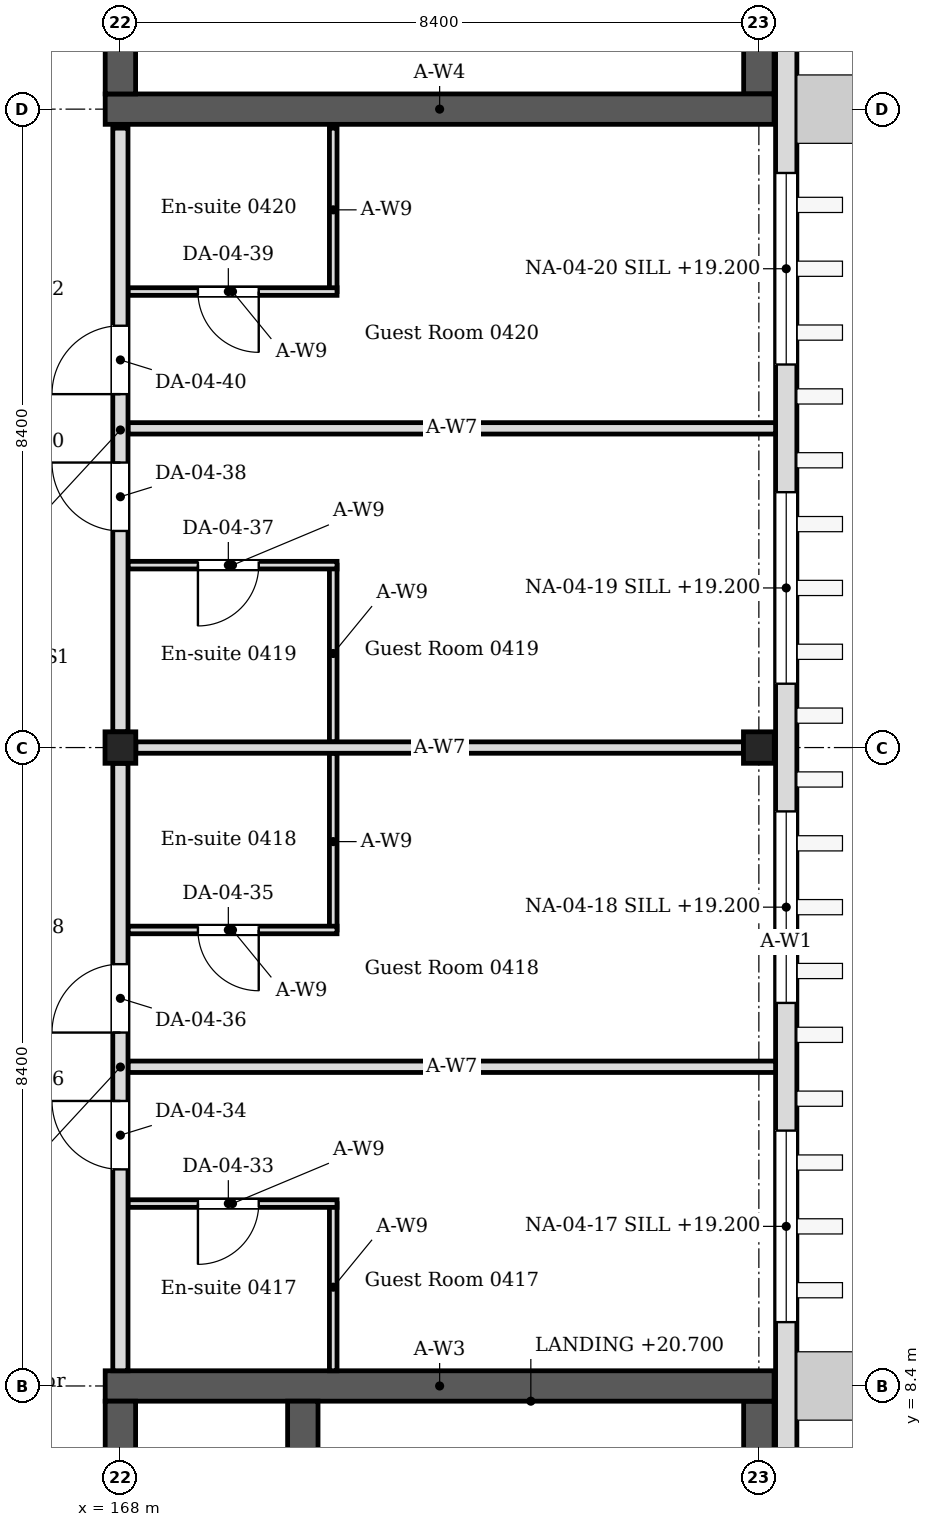
"""IFC4 building model, lengths in metres.
Left out: names, types, materials, properties, quantities, classifications, styles, units other than length and angle.
Written with IfcOpenShell. Run it as: python <this file> out.ifc"""

import sys

from ifc_helpers import new_model, si_unit, direction, frame, frame_2d, origin, origin_2d, place, context, subcontext, project, spatial, rectangle, i_section, extrude, element, fill, save


model = new_model("IFC4")
c1 = context("Model", 3, precision=1e-05, world=origin(), true_north=direction((0.0, 1.0)))
c2 = subcontext(c1, "Body", "Model", "MODEL_VIEW")
j1 = project(units=[si_unit("LENGTHUNIT", "METRE"), si_unit("PLANEANGLEUNIT", "RADIAN")], contexts=[c1])
p1 = place(None, origin())
s1 = spatial("IfcSite", under=j1, at=p1, CompositionType="ELEMENT")
p2 = place(p1, origin())
s2 = spatial("IfcBuilding", under=s1, at=p2, CompositionType="ELEMENT")
p3 = place(p2, frame((0.0, 0.0, 18.6)))
s3 = spatial("IfcBuildingStorey", under=s2, at=p3, CompositionType="ELEMENT", Elevation=18.6)
for number, where, z_axis, x_axis in (
    (1, (168.0, 16.8, 0.0), (0.0, 0.0, 1.0), (1.0, 0.0, 0.0)),
    (2, (176.4, 16.8, 0.0), (0.0, 0.0, 1.0), (1.0, 0.0, 0.0)),
):
    element("IfcColumn", number, at=place(p3, frame(where, z_axis=z_axis, x_axis=x_axis)), inside=s3, PredefinedType="COLUMN", context=c2, shape_type="SweptSolid", body=[
        extrude(i_section(OverallWidth=0.405, OverallDepth=0.414, WebThickness=0.018, FlangeThickness=0.028, FilletRadius=0.022, at=origin_2d()), origin(), (0.0, 0.0, 1.0), 4.2),
    ])
p4 = place(p3, frame((167.8, 8.4, 0.0), z_axis=(0.0, 0.0, 1.0), x_axis=(1.0, 0.0, 0.0)))
e3 = element("IfcWall", 3, at=p4, inside=s3, PredefinedType="SOLIDWALL", context=c2, shape_type="SweptSolid", body=[
    extrude(rectangle(XDim=8.8, YDim=0.4, at=frame_2d((4.4, 0.0))), origin(), (0.0, 0.0, 1.0), 4.05),
])
p5 = place(p3, frame((168.0, 0.2, 0.0), z_axis=(0.0, 0.0, 1.0), x_axis=(0.0, 1.0, 0.0)))
e4 = element("IfcWall", 4, at=p5, inside=s3, PredefinedType="SOLIDWALL", context=c2, shape_type="SweptSolid", body=[
    extrude(rectangle(XDim=8.0, YDim=0.4, at=frame_2d((4.0, 0.0))), origin(), (0.0, 0.0, 1.0), 4.05),
])
p6 = place(p5, frame((1.75, 0.0, 0.0)))
e5 = element("IfcOpeningElement", 5, at=p6, cuts=e4, PredefinedType="OPENING", context=c2, shape_type="SweptSolid", body=[
    extrude(rectangle(XDim=1.0, YDim=2.1, at=frame_2d((0.5, 1.05))), frame((0.0, 0.21, 0.0), z_axis=(0.0, -1.0, 0.0), x_axis=(1.0, 0.0, 0.0)), (0.0, 0.0, 1.0), 0.42),
])
p7 = place(p5, frame((5.675, 0.0, 0.0)))
e6 = element("IfcOpeningElement", 6, at=p7, cuts=e4, PredefinedType="OPENING", context=c2, shape_type="SweptSolid", body=[
    extrude(rectangle(XDim=1.05, YDim=2.1, at=frame_2d((0.525, 1.05))), frame((0.0, 0.21, 0.0), z_axis=(0.0, -1.0, 0.0), x_axis=(1.0, 0.0, 0.0)), (0.0, 0.0, 1.0), 0.42),
])
p8 = place(p3, frame((176.4, 0.2, 0.0), z_axis=(0.0, 0.0, 1.0), x_axis=(0.0, 1.0, 0.0)))
e7 = element("IfcWall", 7, at=p8, inside=s3, PredefinedType="SOLIDWALL", context=c2, shape_type="SweptSolid", body=[
    extrude(rectangle(XDim=8.0, YDim=0.4, at=frame_2d((4.0, 0.0))), origin(), (0.0, 0.0, 1.0), 4.05),
])
p9 = place(p3, frame((167.8, 25.2, 0.0), z_axis=(0.0, 0.0, 1.0), x_axis=(1.0, 0.0, 0.0)))
e8 = element("IfcWall", 8, at=p9, inside=s3, PredefinedType="SOLIDWALL", context=c2, shape_type="SweptSolid", body=[
    extrude(rectangle(XDim=8.8, YDim=0.4, at=frame_2d((4.4, 0.0))), origin(), (0.0, 0.0, 1.0), 4.05),
])
p10 = place(p3, frame((168.0, 25.4, 0.0), z_axis=(0.0, 0.0, 1.0), x_axis=(0.0, 1.0, 0.0)))
e9 = element("IfcWall", 9, at=p10, inside=s3, PredefinedType="SOLIDWALL", context=c2, shape_type="SweptSolid", body=[
    extrude(rectangle(XDim=16.4, YDim=0.4, at=frame_2d((8.2, 0.0))), origin(), (0.0, 0.0, 1.0), 4.05),
])
p11 = place(p10, frame((1.0, 0.0, 0.0)))
e10 = element("IfcOpeningElement", 10, at=p11, cuts=e9, PredefinedType="OPENING", context=c2, shape_type="SweptSolid", body=[
    extrude(rectangle(XDim=1.0, YDim=2.1, at=frame_2d((0.5, 1.05))), frame((0.0, 0.21, 0.0), z_axis=(0.0, -1.0, 0.0), x_axis=(1.0, 0.0, 0.0)), (0.0, 0.0, 1.0), 0.42),
])
p12 = place(p10, frame((14.4, 0.0, 0.0)))
e11 = element("IfcOpeningElement", 11, at=p12, cuts=e9, PredefinedType="OPENING", context=c2, shape_type="SweptSolid", body=[
    extrude(rectangle(XDim=1.4, YDim=2.1, at=frame_2d((0.7, 1.05))), frame((0.0, 0.21, 0.0), z_axis=(0.0, -1.0, 0.0), x_axis=(1.0, 0.0, 0.0)), (0.0, 0.0, 1.0), 0.42),
])
p13 = place(p3, frame((176.4, 25.4, 0.0), z_axis=(0.0, 0.0, 1.0), x_axis=(0.0, 1.0, 0.0)))
e12 = element("IfcWall", 12, at=p13, inside=s3, PredefinedType="SOLIDWALL", context=c2, shape_type="SweptSolid", body=[
    extrude(rectangle(XDim=16.4, YDim=0.4, at=frame_2d((8.2, 0.0))), origin(), (0.0, 0.0, 1.0), 4.05),
])
p14 = place(p3, frame((176.76, -0.22, 0.0), z_axis=(0.0, 0.0, 1.0), x_axis=(0.0, 1.0, 0.0)))
e13 = element("IfcWall", 13, at=p14, inside=s3, PredefinedType="SOLIDWALL", context=c2, shape_type="SweptSolid", body=[
    extrude(rectangle(XDim=42.57, YDim=0.28, at=frame_2d((21.285, 0.0))), origin(), (0.0, 0.0, 1.0), 4.05),
])
p15 = place(p14, frame((9.46, 0.0, 0.6)))
e14 = element("IfcOpeningElement", 14, at=p15, cuts=e13, PredefinedType="OPENING", context=c2, shape_type="SweptSolid", body=[
    extrude(rectangle(XDim=2.52, YDim=2.4, at=frame_2d((1.26, 1.2))), frame((0.0, 0.15, 0.0), z_axis=(0.0, -1.0, 0.0), x_axis=(1.0, 0.0, 0.0)), (0.0, 0.0, 1.0), 0.3),
])
p16 = place(p14, frame((13.66, 0.0, 0.6)))
e15 = element("IfcOpeningElement", 15, at=p16, cuts=e13, PredefinedType="OPENING", context=c2, shape_type="SweptSolid", body=[
    extrude(rectangle(XDim=2.52, YDim=2.4, at=frame_2d((1.26, 1.2))), frame((0.0, 0.15, 0.0), z_axis=(0.0, -1.0, 0.0), x_axis=(1.0, 0.0, 0.0)), (0.0, 0.0, 1.0), 0.3),
])
p17 = place(p14, frame((17.86, 0.0, 0.6)))
e16 = element("IfcOpeningElement", 16, at=p17, cuts=e13, PredefinedType="OPENING", context=c2, shape_type="SweptSolid", body=[
    extrude(rectangle(XDim=2.52, YDim=2.4, at=frame_2d((1.26, 1.2))), frame((0.0, 0.15, 0.0), z_axis=(0.0, -1.0, 0.0), x_axis=(1.0, 0.0, 0.0)), (0.0, 0.0, 1.0), 0.3),
])
p18 = place(p14, frame((22.06, 0.0, 0.6)))
e17 = element("IfcOpeningElement", 17, at=p18, cuts=e13, PredefinedType="OPENING", context=c2, shape_type="SweptSolid", body=[
    extrude(rectangle(XDim=2.52, YDim=2.4, at=frame_2d((1.26, 1.2))), frame((0.0, 0.15, 0.0), z_axis=(0.0, -1.0, 0.0), x_axis=(1.0, 0.0, 0.0)), (0.0, 0.0, 1.0), 0.3),
])
p19 = place(p3, frame((170.8, 8.6, 0.0), z_axis=(0.0, 0.0, 1.0), x_axis=(0.0, 1.0, 0.0)))
e18 = element("IfcWall", 18, at=p19, inside=s3, PredefinedType="PARTITIONING", context=c2, shape_type="SweptSolid", body=[
    extrude(rectangle(XDim=2.2, YDim=0.1, at=frame_2d((1.1, 0.0))), origin(), (0.0, 0.0, 1.0), 4.05),
])
p20 = place(p3, frame((170.85, 10.8, 0.0), z_axis=(0.0, 0.0, 1.0), x_axis=(-1.0, 0.0, 0.0)))
e19 = element("IfcWall", 19, at=p20, inside=s3, PredefinedType="PARTITIONING", context=c2, shape_type="SweptSolid", body=[
    extrude(rectangle(XDim=2.75, YDim=0.1, at=frame_2d((1.375, 0.0))), origin(), (0.0, 0.0, 1.0), 4.05),
])
p21 = place(p20, frame((1.03, 0.0, 0.0)))
e20 = element("IfcOpeningElement", 20, at=p21, cuts=e19, PredefinedType="OPENING", context=c2, shape_type="SweptSolid", body=[
    extrude(rectangle(XDim=0.8, YDim=2.1, at=frame_2d((0.4, 1.05))), frame((0.0, 0.06, 0.0), z_axis=(0.0, -1.0, 0.0), x_axis=(1.0, 0.0, 0.0)), (0.0, 0.0, 1.0), 0.12),
])
p22 = place(p3, frame((170.8, 14.4, 0.0), z_axis=(0.0, 0.0, 1.0), x_axis=(0.0, 1.0, 0.0)))
e21 = element("IfcWall", 21, at=p22, inside=s3, PredefinedType="PARTITIONING", context=c2, shape_type="SweptSolid", body=[
    extrude(rectangle(XDim=2.325, YDim=0.1, at=frame_2d((1.163, 0.0))), origin(), (0.0, 0.0, 1.0), 4.05),
])
p23 = place(p3, frame((170.85, 14.4, 0.0), z_axis=(0.0, 0.0, 1.0), x_axis=(-1.0, 0.0, 0.0)))
e22 = element("IfcWall", 22, at=p23, inside=s3, PredefinedType="PARTITIONING", context=c2, shape_type="SweptSolid", body=[
    extrude(rectangle(XDim=2.75, YDim=0.1, at=frame_2d((1.375, 0.0))), origin(), (0.0, 0.0, 1.0), 4.05),
])
p24 = place(p23, frame((1.03, 0.0, 0.0)))
e23 = element("IfcOpeningElement", 23, at=p24, cuts=e22, PredefinedType="OPENING", context=c2, shape_type="SweptSolid", body=[
    extrude(rectangle(XDim=0.8, YDim=2.1, at=frame_2d((0.4, 1.05))), frame((0.0, 0.06, 0.0), z_axis=(0.0, -1.0, 0.0), x_axis=(1.0, 0.0, 0.0)), (0.0, 0.0, 1.0), 0.12),
])
p25 = place(p3, frame((170.8, 16.875, 0.0), z_axis=(0.0, 0.0, 1.0), x_axis=(0.0, 1.0, 0.0)))
e24 = element("IfcWall", 24, at=p25, inside=s3, PredefinedType="PARTITIONING", context=c2, shape_type="SweptSolid", body=[
    extrude(rectangle(XDim=2.325, YDim=0.1, at=frame_2d((1.163, 0.0))), origin(), (0.0, 0.0, 1.0), 4.05),
])
p26 = place(p3, frame((170.85, 19.2, 0.0), z_axis=(0.0, 0.0, 1.0), x_axis=(-1.0, 0.0, 0.0)))
e25 = element("IfcWall", 25, at=p26, inside=s3, PredefinedType="PARTITIONING", context=c2, shape_type="SweptSolid", body=[
    extrude(rectangle(XDim=2.75, YDim=0.1, at=frame_2d((1.375, 0.0))), origin(), (0.0, 0.0, 1.0), 4.05),
])
p27 = place(p26, frame((1.03, 0.0, 0.0)))
e26 = element("IfcOpeningElement", 26, at=p27, cuts=e25, PredefinedType="OPENING", context=c2, shape_type="SweptSolid", body=[
    extrude(rectangle(XDim=0.8, YDim=2.1, at=frame_2d((0.4, 1.05))), frame((0.0, 0.06, 0.0), z_axis=(0.0, -1.0, 0.0), x_axis=(1.0, 0.0, 0.0)), (0.0, 0.0, 1.0), 0.12),
])
p28 = place(p3, frame((170.8, 22.8, 0.0), z_axis=(0.0, 0.0, 1.0), x_axis=(0.0, 1.0, 0.0)))
e27 = element("IfcWall", 27, at=p28, inside=s3, PredefinedType="PARTITIONING", context=c2, shape_type="SweptSolid", body=[
    extrude(rectangle(XDim=2.15, YDim=0.1, at=frame_2d((1.075, 0.0))), origin(), (0.0, 0.0, 1.0), 4.05),
])
p29 = place(p3, frame((170.85, 22.8, 0.0), z_axis=(0.0, 0.0, 1.0), x_axis=(-1.0, 0.0, 0.0)))
e28 = element("IfcWall", 28, at=p29, inside=s3, PredefinedType="PARTITIONING", context=c2, shape_type="SweptSolid", body=[
    extrude(rectangle(XDim=2.75, YDim=0.1, at=frame_2d((1.375, 0.0))), origin(), (0.0, 0.0, 1.0), 4.05),
])
p30 = place(p29, frame((1.03, 0.0, 0.0)))
e29 = element("IfcOpeningElement", 29, at=p30, cuts=e28, PredefinedType="OPENING", context=c2, shape_type="SweptSolid", body=[
    extrude(rectangle(XDim=0.8, YDim=2.1, at=frame_2d((0.4, 1.05))), frame((0.0, 0.06, 0.0), z_axis=(0.0, -1.0, 0.0), x_axis=(1.0, 0.0, 0.0)), (0.0, 0.0, 1.0), 0.12),
])
p31 = place(p3, frame((168.202, 16.8, 0.0), z_axis=(0.0, 0.0, 1.0), x_axis=(1.0, 0.0, 0.0)))
e30 = element("IfcWall", 30, at=p31, inside=s3, PredefinedType="PARTITIONING", context=c2, shape_type="SweptSolid", body=[
    extrude(rectangle(XDim=7.995, YDim=0.15, at=frame_2d((3.998, 0.0))), origin(), (0.0, 0.0, 1.0), 3.604),
])
for number, where, z_axis, x_axis in (
    (31, (168.1, 12.6, 0.0), (0.0, 0.0, 1.0), (1.0, 0.0, 0.0)),
    (32, (168.1, 21.0, 0.0), (0.0, 0.0, 1.0), (1.0, 0.0, 0.0)),
):
    element("IfcWall", number, at=place(p3, frame(where, z_axis=z_axis, x_axis=x_axis)), inside=s3, PredefinedType="PARTITIONING", context=c2, shape_type="SweptSolid", body=[
        extrude(rectangle(XDim=8.52, YDim=0.15, at=frame_2d((4.26, 0.0))), origin(), (0.0, 0.0, 1.0), 3.604),
    ])
p32 = place(p3, frame((168.0, 8.6, 0.0), z_axis=(0.0, 0.0, 1.0), x_axis=(0.0, 1.0, 0.0)))
e33 = element("IfcWall", 33, at=p32, inside=s3, PredefinedType="PARTITIONING", context=c2, shape_type="SweptSolid", body=[
    extrude(rectangle(XDim=7.993, YDim=0.2, at=frame_2d((3.997, 0.0))), origin(), (0.0, 0.0, 1.0), 3.45),
])
p33 = place(p32, frame((2.65, 0.0, 0.0)))
e34 = element("IfcOpeningElement", 34, at=p33, cuts=e33, PredefinedType="OPENING", context=c2, shape_type="SweptSolid", body=[
    extrude(rectangle(XDim=0.9, YDim=2.1, at=frame_2d((0.45, 1.05))), frame((0.0, 0.11, 0.0), z_axis=(0.0, -1.0, 0.0), x_axis=(1.0, 0.0, 0.0)), (0.0, 0.0, 1.0), 0.22),
])
p34 = place(p32, frame((4.45, 0.0, 0.0)))
e35 = element("IfcOpeningElement", 35, at=p34, cuts=e33, PredefinedType="OPENING", context=c2, shape_type="SweptSolid", body=[
    extrude(rectangle(XDim=0.9, YDim=2.1, at=frame_2d((0.45, 1.05))), frame((0.0, 0.11, 0.0), z_axis=(0.0, -1.0, 0.0), x_axis=(1.0, 0.0, 0.0)), (0.0, 0.0, 1.0), 0.22),
])
p35 = place(p3, frame((168.0, 17.007, 0.0), z_axis=(0.0, 0.0, 1.0), x_axis=(0.0, 1.0, 0.0)))
e36 = element("IfcWall", 36, at=p35, inside=s3, PredefinedType="PARTITIONING", context=c2, shape_type="SweptSolid", body=[
    extrude(rectangle(XDim=7.943, YDim=0.2, at=frame_2d((3.971, 0.0))), origin(), (0.0, 0.0, 1.0), 3.45),
])
p36 = place(p35, frame((2.643, 0.0, 0.0)))
e37 = element("IfcOpeningElement", 37, at=p36, cuts=e36, PredefinedType="OPENING", context=c2, shape_type="SweptSolid", body=[
    extrude(rectangle(XDim=0.9, YDim=2.1, at=frame_2d((0.45, 1.05))), frame((0.0, 0.11, 0.0), z_axis=(0.0, -1.0, 0.0), x_axis=(1.0, 0.0, 0.0)), (0.0, 0.0, 1.0), 0.22),
])
p37 = place(p35, frame((4.443, 0.0, 0.0)))
e38 = element("IfcOpeningElement", 38, at=p37, cuts=e36, PredefinedType="OPENING", context=c2, shape_type="SweptSolid", body=[
    extrude(rectangle(XDim=0.9, YDim=2.1, at=frame_2d((0.45, 1.05))), frame((0.0, 0.11, 0.0), z_axis=(0.0, -1.0, 0.0), x_axis=(1.0, 0.0, 0.0)), (0.0, 0.0, 1.0), 0.22),
])
p38 = place(p3, frame((170.4, 0.2, 0.0), z_axis=(0.0, 0.0, 1.0), x_axis=(0.0, 1.0, 0.0)))
e39 = element("IfcWall", 39, at=p38, inside=s3, PredefinedType="SOLIDWALL", context=c2, shape_type="SweptSolid", body=[
    extrude(rectangle(XDim=8.0, YDim=0.4, at=frame_2d((4.0, 0.0))), origin(), (0.0, 0.0, 1.0), 4.05),
])
p39 = place(p38, frame((0.3, 0.0, 0.0)))
e40 = element("IfcOpeningElement", 40, at=p39, cuts=e39, PredefinedType="OPENING", context=c2, shape_type="SweptSolid", body=[
    extrude(rectangle(XDim=0.9, YDim=2.1, at=frame_2d((0.45, 1.05))), frame((0.0, 0.21, 0.0), z_axis=(0.0, -1.0, 0.0), x_axis=(1.0, 0.0, 0.0)), (0.0, 0.0, 1.0), 0.42),
])
p40 = place(p15, origin())
e41 = element("IfcWindow", 41, at=p40, inside=s3, PartitioningType="SINGLE_PANEL", PredefinedType="WINDOW", context=c2, shape_type="SweptSolid", body=[
    extrude(rectangle(XDim=2.52, YDim=2.4, at=frame_2d((1.26, 1.2))), frame((0.0, 0.03, 0.0), z_axis=(0.0, -1.0, 0.0), x_axis=(1.0, 0.0, 0.0)), (0.0, 0.0, 1.0), 0.06),
])
fill(e14, e41)
p41 = place(p16, origin())
e42 = element("IfcWindow", 42, at=p41, inside=s3, PartitioningType="SINGLE_PANEL", PredefinedType="WINDOW", context=c2, shape_type="SweptSolid", body=[
    extrude(rectangle(XDim=2.52, YDim=2.4, at=frame_2d((1.26, 1.2))), frame((0.0, 0.03, 0.0), z_axis=(0.0, -1.0, 0.0), x_axis=(1.0, 0.0, 0.0)), (0.0, 0.0, 1.0), 0.06),
])
fill(e15, e42)
p42 = place(p17, origin())
e43 = element("IfcWindow", 43, at=p42, inside=s3, PartitioningType="SINGLE_PANEL", PredefinedType="WINDOW", context=c2, shape_type="SweptSolid", body=[
    extrude(rectangle(XDim=2.52, YDim=2.4, at=frame_2d((1.26, 1.2))), frame((0.0, 0.03, 0.0), z_axis=(0.0, -1.0, 0.0), x_axis=(1.0, 0.0, 0.0)), (0.0, 0.0, 1.0), 0.06),
])
fill(e16, e43)
p43 = place(p18, origin())
e44 = element("IfcWindow", 44, at=p43, inside=s3, PartitioningType="SINGLE_PANEL", PredefinedType="WINDOW", context=c2, shape_type="SweptSolid", body=[
    extrude(rectangle(XDim=2.52, YDim=2.4, at=frame_2d((1.26, 1.2))), frame((0.0, 0.03, 0.0), z_axis=(0.0, -1.0, 0.0), x_axis=(1.0, 0.0, 0.0)), (0.0, 0.0, 1.0), 0.06),
])
fill(e17, e44)
p44 = place(p21, origin())
e45 = element("IfcDoor", 45, at=p44, inside=s3, OperationType="SINGLE_SWING_RIGHT", PredefinedType="DOOR", context=c2, shape_type="SweptSolid", body=[
    extrude(rectangle(XDim=0.8, YDim=2.1, at=frame_2d((0.4, 1.05))), frame((0.0, 0.025, 0.0), z_axis=(0.0, -1.0, 0.0), x_axis=(1.0, 0.0, 0.0)), (0.0, 0.0, 1.0), 0.05),
])
fill(e20, e45)
p45 = place(p33, origin())
e46 = element("IfcDoor", 46, at=p45, inside=s3, OperationType="SINGLE_SWING_RIGHT", PredefinedType="DOOR", context=c2, shape_type="SweptSolid", body=[
    extrude(rectangle(XDim=0.9, YDim=2.1, at=frame_2d((0.45, 1.05))), frame((0.0, 0.025, 0.0), z_axis=(0.0, -1.0, 0.0), x_axis=(1.0, 0.0, 0.0)), (0.0, 0.0, 1.0), 0.05),
])
fill(e34, e46)
p46 = place(p24, origin())
e47 = element("IfcDoor", 47, at=p46, inside=s3, OperationType="SINGLE_SWING_LEFT", PredefinedType="DOOR", context=c2, shape_type="SweptSolid", body=[
    extrude(rectangle(XDim=0.8, YDim=2.1, at=frame_2d((0.4, 1.05))), frame((0.0, 0.025, 0.0), z_axis=(0.0, -1.0, 0.0), x_axis=(1.0, 0.0, 0.0)), (0.0, 0.0, 1.0), 0.05),
])
fill(e23, e47)
p47 = place(p34, origin())
e48 = element("IfcDoor", 48, at=p47, inside=s3, OperationType="SINGLE_SWING_LEFT", PredefinedType="DOOR", context=c2, shape_type="SweptSolid", body=[
    extrude(rectangle(XDim=0.9, YDim=2.1, at=frame_2d((0.45, 1.05))), frame((0.0, 0.025, 0.0), z_axis=(0.0, -1.0, 0.0), x_axis=(1.0, 0.0, 0.0)), (0.0, 0.0, 1.0), 0.05),
])
fill(e35, e48)
p48 = place(p27, origin())
e49 = element("IfcDoor", 49, at=p48, inside=s3, OperationType="SINGLE_SWING_RIGHT", PredefinedType="DOOR", context=c2, shape_type="SweptSolid", body=[
    extrude(rectangle(XDim=0.8, YDim=2.1, at=frame_2d((0.4, 1.05))), frame((0.0, 0.025, 0.0), z_axis=(0.0, -1.0, 0.0), x_axis=(1.0, 0.0, 0.0)), (0.0, 0.0, 1.0), 0.05),
])
fill(e26, e49)
p49 = place(p36, origin())
e50 = element("IfcDoor", 50, at=p49, inside=s3, OperationType="SINGLE_SWING_RIGHT", PredefinedType="DOOR", context=c2, shape_type="SweptSolid", body=[
    extrude(rectangle(XDim=0.9, YDim=2.1, at=frame_2d((0.45, 1.05))), frame((0.0, 0.025, 0.0), z_axis=(0.0, -1.0, 0.0), x_axis=(1.0, 0.0, 0.0)), (0.0, 0.0, 1.0), 0.05),
])
fill(e37, e50)
p50 = place(p30, origin())
e51 = element("IfcDoor", 51, at=p50, inside=s3, OperationType="SINGLE_SWING_LEFT", PredefinedType="DOOR", context=c2, shape_type="SweptSolid", body=[
    extrude(rectangle(XDim=0.8, YDim=2.1, at=frame_2d((0.4, 1.05))), frame((0.0, 0.025, 0.0), z_axis=(0.0, -1.0, 0.0), x_axis=(1.0, 0.0, 0.0)), (0.0, 0.0, 1.0), 0.05),
])
fill(e29, e51)
p51 = place(p37, origin())
e52 = element("IfcDoor", 52, at=p51, inside=s3, OperationType="SINGLE_SWING_LEFT", PredefinedType="DOOR", context=c2, shape_type="SweptSolid", body=[
    extrude(rectangle(XDim=0.9, YDim=2.1, at=frame_2d((0.45, 1.05))), frame((0.0, 0.025, 0.0), z_axis=(0.0, -1.0, 0.0), x_axis=(1.0, 0.0, 0.0)), (0.0, 0.0, 1.0), 0.05),
])
fill(e38, e52)
save(model, sys.argv[1])
